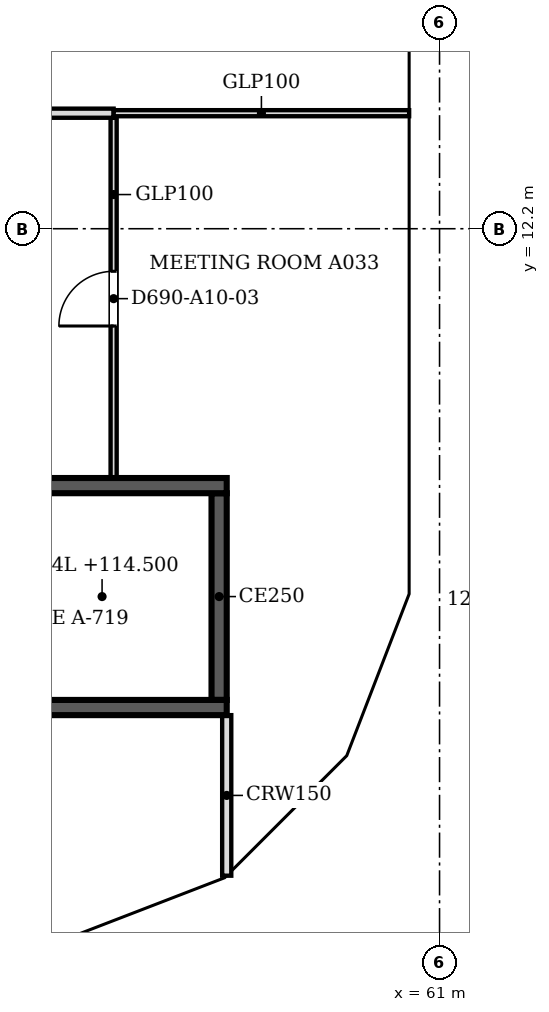
"""IFC4 building model, lengths in metres.
Left out: names, types, materials, properties, quantities, classifications, styles, units other than length and angle.
Written with IfcOpenShell. Run it as: python <this file> out.ifc"""

import sys

from ifc_helpers import new_model, si_unit, direction, frame, frame_2d, origin, place, context, subcontext, project, spatial, polyline, rectangle, outline, extrude, faceted_brep, source, transform, mapped, element, fill, save


model = new_model("IFC4")
c1 = context("Model", 3, precision=1e-05, world=origin(), true_north=direction((0.0, 1.0)))
c2 = subcontext(c1, "Body", "Model", "MODEL_VIEW")
j1 = project(units=[si_unit("LENGTHUNIT", "METRE"), si_unit("PLANEANGLEUNIT", "RADIAN")], contexts=[c1])
p1 = place(None, origin())
s1 = spatial("IfcSite", under=j1, at=p1, CompositionType="ELEMENT")
p2 = place(p1, origin())
s2 = spatial("IfcBuilding", under=s1, at=p2, CompositionType="ELEMENT")
p3 = place(p2, frame((0.0, 0.0, 112.6)))
s3 = spatial("IfcBuildingStorey", under=s2, at=p3, CompositionType="ELEMENT", Elevation=112.6)
m1 = source(origin(), c2, "Body", "Brep", [
    faceted_brep([(2.997, -0.25, 0.0), (0.047, -0.25, 3.8), (0.0, -0.25, 3.741), (0.0, -0.25, 0.0), (0.093, 0.25, 3.74), (2.944, 0.25, 0.068), (2.944, 0.25, 0.0), (0.093, 0.25, 0.0), (0.047, 0.0, 3.8), (2.997, 0.0, 0.0)], [[[0, 1, 2, 3]], [[4, 5, 6, 7]], [[5, 4, 8, 1, 0, 9]], [[2, 1, 8]], [[7, 6, 9, 0, 3]], [[7, 3, 2, 8, 4]], [[9, 6, 5]]]),
])
p4 = place(p3, frame((54.81, 0.233, 0.0), z_axis=(0.0, 0.0, 1.0), x_axis=(0.932990326376, 0.359901446078, 0.0)))
e1 = element("IfcWall", 1, at=p4, inside=s3, PredefinedType="SOLIDWALL", context=c2, shape_type="MappedRepresentation", body=[
    mapped(m1, transform((0.0, 0.0, 0.0), scale=1.0)),
])
m2 = source(origin(), c2, "Body", "SweptSolid", [
    extrude(outline(polyline([(2.487, 0.25), (0.247, 3.135), (0.247, 0.25), (2.487, 0.25)])), frame((0.0, 0.26, 0.0), z_axis=(0.0, -1.0, 0.0), x_axis=(1.0, 0.0, 0.0)), (0.0, 0.0, 1.0), 0.52),
])
p5 = place(p4, origin())
e2 = element("IfcOpeningElement", 2, at=p5, cuts=e1, PredefinedType="OPENING", context=c2, shape_type="MappedRepresentation", body=[
    mapped(m2, transform((0.0, 0.0, 0.0), scale=1.0)),
])
m3 = source(origin(), c2, "Body", "Brep", [
    faceted_brep([(2.997, -0.25, 3.732), (2.944, -0.25, 3.8), (0.0, -0.25, 0.0), (2.997, -0.25, 0.0), (0.053, 0.25, 0.068), (2.891, 0.25, 3.732), (2.891, 0.25, 0.0), (0.053, 0.25, 0.0), (2.944, 0.0, 3.8), (0.0, 0.0, 0.0)], [[[0, 1, 2, 3]], [[4, 5, 6, 7]], [[8, 1, 0]], [[5, 4, 9, 2, 1, 8]], [[7, 6, 3, 2, 9]], [[7, 9, 4]], [[3, 6, 5, 8, 0]]]),
])
p6 = place(p3, frame((57.606, 1.312, 0.0), z_axis=(0.0, 0.0, 1.0), x_axis=(0.707147509625, 0.707066050402, 0.0)))
e3 = element("IfcWall", 3, at=p6, inside=s3, PredefinedType="SOLIDWALL", context=c2, shape_type="MappedRepresentation", body=[
    mapped(m3, transform((0.0, 0.0, 0.0), scale=1.0)),
])
m4 = source(origin(), c2, "Body", "SweptSolid", [
    extrude(outline(polyline([(2.744, 3.134), (0.51, 0.25), (2.744, 0.25), (2.744, 3.134)])), frame((0.0, 0.26, 0.0), z_axis=(0.0, -1.0, 0.0), x_axis=(1.0, 0.0, 0.0)), (0.0, 0.0, 1.0), 0.52),
])
p7 = place(p6, origin())
e4 = element("IfcOpeningElement", 4, at=p7, cuts=e3, PredefinedType="OPENING", context=c2, shape_type="MappedRepresentation", body=[
    mapped(m4, transform((0.0, 0.0, 0.0), scale=1.0)),
])
m5 = source(origin(), c2, "Body", "Brep", [
    faceted_brep([(3.003, -0.25, 0.0), (0.053, -0.25, 3.8), (0.0, -0.25, 3.731), (0.0, -0.25, 0.0), (0.106, 0.25, 3.732), (2.957, 0.25, 0.06), (2.957, 0.25, 0.0), (0.106, 0.25, 0.0), (0.053, 0.0, 3.8), (3.003, 0.0, 0.0)], [[[0, 1, 2, 3]], [[4, 5, 6, 7]], [[5, 4, 8, 1, 0, 9]], [[2, 1, 8]], [[7, 6, 9, 0, 3]], [[7, 3, 2, 8, 4]], [[9, 6, 5]]]),
])
p8 = place(p3, frame((59.669, 3.344, 0.0), z_axis=(0.0, 0.0, 1.0), x_axis=(0.35992665181, 0.932980602862, 0.0)))
e5 = element("IfcWall", 5, at=p8, inside=s3, PredefinedType="SOLIDWALL", context=c2, shape_type="MappedRepresentation", body=[
    mapped(m5, transform((0.0, 0.0, 0.0), scale=1.0)),
])
m6 = source(origin(), c2, "Body", "SweptSolid", [
    extrude(outline(polyline([(2.493, 0.25), (0.253, 3.135), (0.253, 0.25), (2.493, 0.25)])), frame((0.0, 0.26, 0.0), z_axis=(0.0, -1.0, 0.0), x_axis=(1.0, 0.0, 0.0)), (0.0, 0.0, 1.0), 0.52),
])
p9 = place(p8, origin())
e6 = element("IfcOpeningElement", 6, at=p9, cuts=e5, PredefinedType="OPENING", context=c2, shape_type="MappedRepresentation", body=[
    mapped(m6, transform((0.0, 0.0, 0.0), scale=1.0)),
])
m7 = source(origin(), c2, "Body", "Brep", [
    faceted_brep([(6.053, -0.25, 0.0), (3.003, -0.25, 3.8), (0.0, -0.25, 0.0), (0.047, 0.25, 0.059), (3.003, 0.25, 3.8), (6.053, 0.25, 0.0), (0.047, 0.25, 0.0), (0.0, 0.0, 0.0)], [[[0, 1, 2]], [[3, 4, 5, 6]], [[5, 4, 1, 0]], [[4, 3, 7, 2, 1]], [[6, 5, 0, 2, 7]], [[6, 7, 3]]]),
])
p10 = place(p3, frame((60.75, 6.146, 0.0), z_axis=(0.0, 0.0, 1.0), x_axis=(0.0, 1.0, 0.0)))
e7 = element("IfcWall", 7, at=p10, inside=s3, PredefinedType="SOLIDWALL", context=c2, shape_type="MappedRepresentation", body=[
    mapped(m7, transform((0.0, 0.0, 0.0), scale=1.0)),
])
m8 = source(origin(), c2, "Body", "SweptSolid", [
    extrude(outline(polyline([(5.532, 0.25), (3.005, 3.399), (0.516, 0.25), (5.532, 0.25)])), frame((0.0, 0.26, 0.0), z_axis=(0.0, -1.0, 0.0), x_axis=(1.0, 0.0, 0.0)), (0.0, 0.0, 1.0), 0.52),
])
p11 = place(p10, origin())
e8 = element("IfcOpeningElement", 8, at=p11, cuts=e7, PredefinedType="OPENING", context=c2, shape_type="MappedRepresentation", body=[
    mapped(m8, transform((0.0, 0.0, 0.0), scale=1.0)),
])
m9 = source(origin(), c2, "Body", "SweptSolid", [
    extrude(outline(polyline([(6.1, 0.0), (3.05, 3.8), (0.0, 0.0), (6.1, 0.0)])), frame((0.0, 0.25, 0.0), z_axis=(0.0, -1.0, 0.0), x_axis=(1.0, 0.0, 0.0)), (0.0, 0.0, 1.0), 0.5),
])
p12 = place(p3, frame((60.75, 12.2, 0.0), z_axis=(0.0, 0.0, 1.0), x_axis=(0.0, 1.0, 0.0)))
e9 = element("IfcWall", 9, at=p12, inside=s3, PredefinedType="SOLIDWALL", context=c2, shape_type="MappedRepresentation", body=[
    mapped(m9, transform((0.0, 0.0, 0.0), scale=1.0)),
])
m10 = source(origin(), c2, "Body", "SweptSolid", [
    extrude(outline(polyline([(5.579, 0.25), (3.05, 3.4), (0.521, 0.25), (5.579, 0.25)])), frame((0.0, 0.26, 0.0), z_axis=(0.0, -1.0, 0.0), x_axis=(1.0, 0.0, 0.0)), (0.0, 0.0, 1.0), 0.52),
])
p13 = place(p12, origin())
e10 = element("IfcOpeningElement", 10, at=p13, cuts=e9, PredefinedType="OPENING", context=c2, shape_type="MappedRepresentation", body=[
    mapped(m10, transform((0.0, 0.0, 0.0), scale=1.0)),
])
p14 = place(p2, frame((0.0, 0.0, 116.4)))
s4 = spatial("IfcBuildingStorey", under=s2, at=p14, CompositionType="ELEMENT", Elevation=116.4)
m11 = source(origin(), c2, "Body", "Brep", [
    faceted_brep([(2.95, -0.25, 0.0), (3.003, -0.25, 0.068), (3.003, -0.25, 7.531), (2.95, -0.25, 7.6), (0.0, -0.25, 3.8), (0.047, 0.25, 3.86), (2.898, 0.25, 7.532), (2.898, 0.25, 0.068), (0.047, 0.25, 3.74), (2.95, 0.0, 0.0), (2.95, 0.0, 7.6), (0.0, 0.0, 3.8)], [[[0, 1, 2, 3, 4]], [[5, 6, 7, 8]], [[1, 0, 9]], [[10, 3, 2]], [[6, 5, 11, 4, 3, 10]], [[8, 7, 9, 0, 4, 11]], [[8, 11, 5]], [[1, 9, 7, 6, 10, 2]]]),
])
p15 = place(p14, frame((54.854, 0.25, -3.8), z_axis=(0.0, 0.0, 1.0), x_axis=(0.932970071518, 0.359953949349, 0.0)))
e11 = element("IfcWall", 11, at=p15, inside=s4, PredefinedType="SOLIDWALL", context=c2, shape_type="MappedRepresentation", body=[
    mapped(m11, transform((0.0, 0.0, 0.0), scale=1.0)),
])
m12 = source(origin(), c2, "Body", "SweptSolid", [
    extrude(outline(polyline([(2.75, 6.935), (0.316, 3.8), (2.75, 0.665), (2.75, 6.935)])), frame((0.0, 0.26, 0.0), z_axis=(0.0, -1.0, 0.0), x_axis=(1.0, 0.0, 0.0)), (0.0, 0.0, 1.0), 0.52),
])
p16 = place(p15, origin())
e12 = element("IfcOpeningElement", 12, at=p16, cuts=e11, PredefinedType="OPENING", context=c2, shape_type="MappedRepresentation", body=[
    mapped(m12, transform((0.0, 0.0, 0.0), scale=1.0)),
])
m13 = source(origin(), c2, "Body", "Brep", [
    faceted_brep([(0.053, -0.25, 0.0), (2.997, -0.25, 3.8), (0.053, -0.25, 7.6), (0.0, -0.25, 7.532), (0.0, -0.25, 0.068), (0.106, 0.25, 7.531), (2.944, 0.25, 3.868), (2.944, 0.25, 3.732), (0.106, 0.25, 0.068), (2.997, 0.0, 3.8), (0.053, 0.0, 0.0), (0.053, 0.0, 7.6)], [[[0, 1, 2, 3, 4]], [[5, 6, 7, 8]], [[8, 7, 9, 1, 0, 10]], [[6, 5, 11, 2, 1, 9]], [[3, 2, 11]], [[10, 0, 4]], [[8, 10, 4, 3, 11, 5]], [[9, 7, 6]]]),
])
p17 = place(p14, frame((57.569, 1.274, -3.8), z_axis=(0.0, 0.0, 1.0), x_axis=(0.707066050402, 0.707147509625, 0.0)))
e13 = element("IfcWall", 13, at=p17, inside=s4, PredefinedType="SOLIDWALL", context=c2, shape_type="MappedRepresentation", body=[
    mapped(m13, transform((0.0, 0.0, 0.0), scale=1.0)),
])
m14 = source(origin(), c2, "Body", "SweptSolid", [
    extrude(outline(polyline([(0.253, 0.666), (2.681, 3.8), (0.253, 6.934), (0.253, 0.666)])), frame((0.0, 0.26, 0.0), z_axis=(0.0, -1.0, 0.0), x_axis=(1.0, 0.0, 0.0)), (0.0, 0.0, 1.0), 0.52),
])
p18 = place(p17, origin())
e14 = element("IfcOpeningElement", 14, at=p18, cuts=e13, PredefinedType="OPENING", context=c2, shape_type="MappedRepresentation", body=[
    mapped(m14, transform((0.0, 0.0, 0.0), scale=1.0)),
])
m15 = source(origin(), c2, "Body", "Brep", [
    faceted_brep([(2.95, -0.25, 0.0), (2.997, -0.25, 0.059), (2.997, -0.25, 7.541), (2.95, -0.25, 7.6), (0.0, -0.25, 3.8), (0.053, 0.25, 3.868), (2.904, 0.25, 7.54), (2.904, 0.25, 0.06), (0.053, 0.25, 3.732), (2.95, 0.0, 0.0), (2.95, 0.0, 7.6), (0.0, 0.0, 3.8)], [[[0, 1, 2, 3, 4]], [[5, 6, 7, 8]], [[1, 0, 9]], [[10, 3, 2]], [[6, 5, 11, 4, 3, 10]], [[8, 7, 9, 0, 4, 11]], [[8, 11, 5]], [[1, 9, 7, 6, 10, 2]]]),
])
p19 = place(p14, frame((59.688, 3.394, -3.8), z_axis=(0.0, 0.0, 1.0), x_axis=(0.359972353723, 0.932962970624, 0.0)))
e15 = element("IfcWall", 15, at=p19, inside=s4, PredefinedType="SOLIDWALL", context=c2, shape_type="MappedRepresentation", body=[
    mapped(m15, transform((0.0, 0.0, 0.0), scale=1.0)),
])
p20 = place(p19, origin())
e16 = element("IfcOpeningElement", 16, at=p20, cuts=e15, PredefinedType="OPENING", context=c2, shape_type="MappedRepresentation", body=[
    mapped(m12, transform((0.0, 0.0, 0.0), scale=1.0)),
])
m16 = source(origin(), c2, "Body", "Brep", [
    faceted_brep([(0.047, -0.25, 0.0), (3.05, -0.25, 3.8), (0.047, -0.25, 7.6), (0.0, -0.25, 7.54), (0.0, -0.25, 0.06), (0.093, 0.25, 7.541), (3.05, 0.25, 3.8), (0.093, 0.25, 0.059), (0.047, 0.0, 0.0), (0.047, 0.0, 7.6)], [[[0, 1, 2, 3, 4]], [[5, 6, 7]], [[7, 6, 1, 0, 8]], [[6, 5, 9, 2, 1]], [[3, 2, 9]], [[8, 0, 4]], [[7, 8, 4, 3, 9, 5]]]),
])
p21 = place(p14, frame((60.75, 6.1, -3.8), z_axis=(0.0, 0.0, 1.0), x_axis=(0.0, 1.0, 0.0)))
e17 = element("IfcWall", 17, at=p21, inside=s4, PredefinedType="SOLIDWALL", context=c2, shape_type="MappedRepresentation", body=[
    mapped(m16, transform((0.0, 0.0, 0.0), scale=1.0)),
])
m17 = source(origin(), c2, "Body", "SweptSolid", [
    extrude(outline(polyline([(0.247, 0.656), (2.731, 3.8), (0.247, 6.944), (0.247, 0.656)])), frame((0.0, 0.26, 0.0), z_axis=(0.0, -1.0, 0.0), x_axis=(1.0, 0.0, 0.0)), (0.0, 0.0, 1.0), 0.52),
])
p22 = place(p21, origin())
e18 = element("IfcOpeningElement", 18, at=p22, cuts=e17, PredefinedType="OPENING", context=c2, shape_type="MappedRepresentation", body=[
    mapped(m17, transform((0.0, 0.0, 0.0), scale=1.0)),
])
m18 = source(origin(), c2, "Body", "SweptSolid", [
    extrude(outline(polyline([(3.05, 0.0), (6.1, 3.8), (3.05, 7.6), (0.0, 3.8), (3.05, 0.0)])), frame((0.0, 0.25, 0.0), z_axis=(0.0, -1.0, 0.0), x_axis=(1.0, 0.0, 0.0)), (0.0, 0.0, 1.0), 0.5),
])
p23 = place(p14, frame((60.75, 9.15, -3.8), z_axis=(0.0, 0.0, 1.0), x_axis=(0.0, 1.0, 0.0)))
e19 = element("IfcWall", 19, at=p23, inside=s4, PredefinedType="SOLIDWALL", context=c2, shape_type="MappedRepresentation", body=[
    mapped(m18, transform((0.0, 0.0, 0.0), scale=1.0)),
])
m19 = source(origin(), c2, "Body", "SweptSolid", [
    extrude(outline(polyline([(3.05, 0.399), (5.78, 3.8), (3.05, 7.2), (0.321, 3.8), (3.05, 0.399)])), frame((0.0, 0.26, 0.0), z_axis=(0.0, -1.0, 0.0), x_axis=(1.0, 0.0, 0.0)), (0.0, 0.0, 1.0), 0.52),
])
p24 = place(p23, origin())
e20 = element("IfcOpeningElement", 20, at=p24, cuts=e19, PredefinedType="OPENING", context=c2, shape_type="MappedRepresentation", body=[
    mapped(m19, transform((0.0, 0.0, 0.0), scale=1.0)),
])
p25 = place(p3, frame((57.5, 4.325, 0.0), z_axis=(0.0, 0.0, 1.0), x_axis=(-1.0, 0.0, 0.0)))
e21 = element("IfcWall", 21, at=p25, inside=s3, PredefinedType="SOLIDWALL", context=c2, shape_type="SweptSolid", body=[
    extrude(rectangle(XDim=8.5, YDim=0.25, at=frame_2d((4.25, 0.0))), origin(), (0.0, 0.0, 1.0), 3.8),
])
m20 = source(origin(), c2, "Body", "SweptSolid", [
    extrude(rectangle(XDim=1.2, YDim=2.1, at=frame_2d((0.6, 1.05))), frame((0.0, 0.135, 0.0), z_axis=(0.0, -1.0, 0.0), x_axis=(1.0, 0.0, 0.0)), (0.0, 0.0, 1.0), 0.27),
])
p26 = place(p25, frame((6.9, 0.0, 0.0)))
e22 = element("IfcOpeningElement", 22, at=p26, cuts=e21, PredefinedType="OPENING", context=c2, shape_type="MappedRepresentation", body=[
    mapped(m20, transform((0.0, 0.0, 0.0), scale=1.0)),
])
p27 = place(p3, frame((49.0, 7.975, 0.0), z_axis=(0.0, 0.0, 1.0), x_axis=(1.0, 0.0, 0.0)))
e23 = element("IfcWall", 23, at=p27, inside=s3, PredefinedType="SOLIDWALL", context=c2, shape_type="SweptSolid", body=[
    extrude(rectangle(XDim=8.5, YDim=0.25, at=frame_2d((4.25, 0.0))), origin(), (0.0, 0.0, 1.0), 3.8),
])
p28 = place(p3, frame((57.375, 7.85, 0.0), z_axis=(0.0, 0.0, 1.0), x_axis=(0.0, -1.0, 0.0)))
e24 = element("IfcWall", 24, at=p28, inside=s3, PredefinedType="SOLIDWALL", context=c2, shape_type="SweptSolid", body=[
    extrude(rectangle(XDim=3.4, YDim=0.25, at=frame_2d((1.7, 0.0))), origin(), (0.0, 0.0, 1.0), 3.8),
])
p29 = place(p3, frame((57.5, 1.559, 0.0), z_axis=(0.0, 0.0, 1.0), x_axis=(0.0, 1.0, 0.0)))
e25 = element("IfcWall", 25, at=p29, inside=s3, PredefinedType="PARTITIONING", context=c2, shape_type="SweptSolid", body=[
    extrude(rectangle(XDim=2.641, YDim=0.15, at=frame_2d((1.32, 0.0))), origin(), (0.0, 0.0, 1.0), 3.067),
])
p30 = place(p3, frame((55.64, 14.024, 0.0), z_axis=(0.0, 0.0, 1.0), x_axis=(0.0, -1.0, 0.0)))
e26 = element("IfcWall", 26, at=p30, inside=s3, PredefinedType="PARTITIONING", context=c2, shape_type="SweptSolid", body=[
    extrude(rectangle(XDim=5.924, YDim=0.1, at=frame_2d((2.962, 0.0))), origin(), (0.0, 0.0, 1.0), 3.067),
])
m21 = source(origin(), c2, "Body", "SweptSolid", [
    extrude(rectangle(XDim=0.9, YDim=2.1, at=frame_2d((0.45, 1.05))), frame((0.0, 0.06, 0.0), z_axis=(0.0, -1.0, 0.0), x_axis=(1.0, 0.0, 0.0)), (0.0, 0.0, 1.0), 0.12),
])
p31 = place(p30, frame((2.524, 0.0, 0.0)))
e27 = element("IfcOpeningElement", 27, at=p31, cuts=e26, PredefinedType="OPENING", context=c2, shape_type="MappedRepresentation", body=[
    mapped(m21, transform((0.0, 0.0, 0.0), scale=1.0)),
])
p32 = place(p3, frame((46.476, 14.1, 0.0), z_axis=(0.0, 0.0, 1.0), x_axis=(1.0, 0.0, 0.0)))
e28 = element("IfcWall", 28, at=p32, inside=s3, PredefinedType="PARTITIONING", context=c2, shape_type="SweptSolid", body=[
    extrude(rectangle(XDim=9.164, YDim=0.15, at=frame_2d((4.582, 0.0))), origin(), (0.0, 0.0, 1.0), 3.067),
])
p33 = place(p3, frame((55.641, 14.1, 0.0), z_axis=(0.0, 0.0, 1.0), x_axis=(1.0, 0.0, 0.0)))
e29 = element("IfcWall", 29, at=p33, inside=s3, PredefinedType="PARTITIONING", context=c2, shape_type="SweptSolid", body=[
    extrude(rectangle(XDim=4.859, YDim=0.1, at=frame_2d((2.429, 0.0))), origin(), (0.0, 0.0, 1.0), 3.067),
])
m22 = source(origin(), c2, "Body", "SweptSolid", [
    extrude(rectangle(XDim=0.9, YDim=2.1, at=frame_2d((0.45, 1.05))), frame((0.0, 0.025, 0.0), z_axis=(0.0, -1.0, 0.0), x_axis=(1.0, 0.0, 0.0)), (0.0, 0.0, 1.0), 0.05),
])
p34 = place(p31, origin())
e30 = element("IfcDoor", 30, at=p34, inside=s3, OperationType="SINGLE_SWING_RIGHT", PredefinedType="DOOR", context=c2, shape_type="MappedRepresentation", body=[
    mapped(m22, transform((0.0, 0.0, 0.0), scale=1.0)),
])
fill(e27, e30)
save(model, sys.argv[1])
